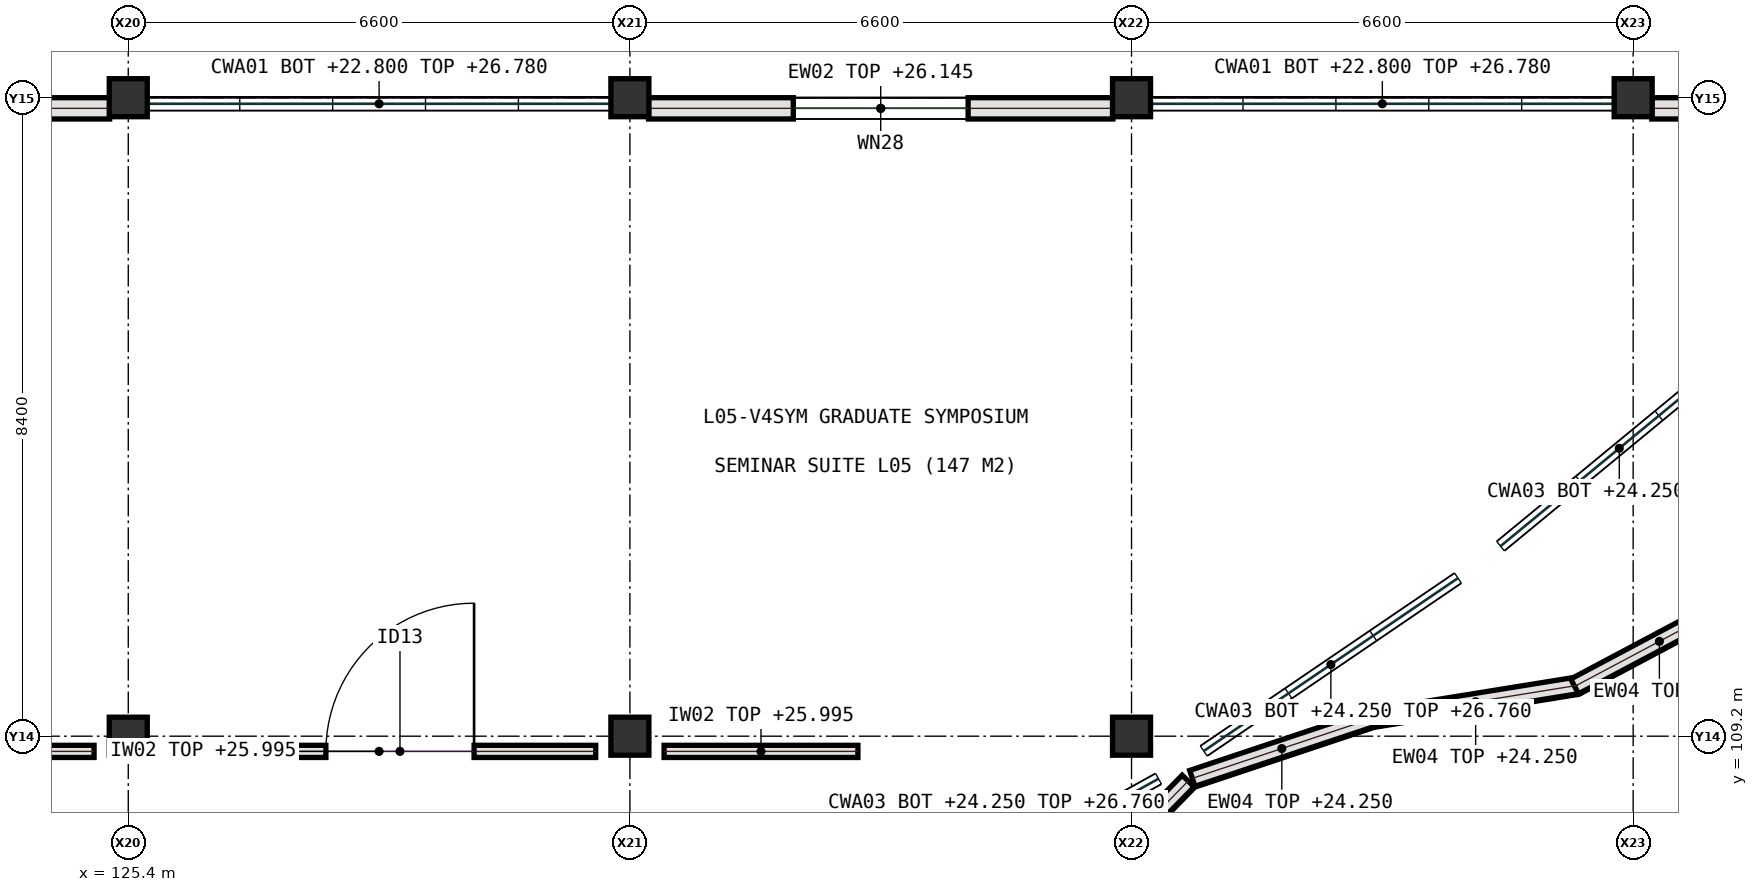
"""IFC4 building model, lengths in metres.
Left out: names, types, materials, properties, quantities, classifications, styles, units other than length and angle.
Written with IfcOpenShell. Run it as: python <this file> out.ifc"""

import sys

from ifc_helpers import new_model, si_unit, direction, frame, frame_2d, origin, origin_2d, place, context, subcontext, project, spatial, rectangle, extrude, element, fill, save


model = new_model("IFC4")
c1 = context("Model", 3, precision=1e-05, world=origin(), true_north=direction((0.0, 1.0)))
c2 = subcontext(c1, "Body", "Model", "MODEL_VIEW")
j1 = project(units=[si_unit("LENGTHUNIT", "METRE"), si_unit("PLANEANGLEUNIT", "RADIAN")], contexts=[c1])
p1 = place(None, origin())
s1 = spatial("IfcSite", under=j1, at=p1, CompositionType="ELEMENT")
p2 = place(p1, origin())
s2 = spatial("IfcBuilding", under=s1, at=p2, CompositionType="ELEMENT")
p3 = place(p2, frame((0.0, 0.0, 22.8)))
s3 = spatial("IfcBuildingStorey", under=s2, at=p3, CompositionType="ELEMENT", Elevation=22.8)
for number, where, z_axis, x_axis in (
    (1, (125.4, 109.2, 0.0), (0.0, 0.0, 1.0), (1.0, 0.0, 0.0)),
    (2, (125.4, 117.6, 0.0), (0.0, 0.0, 1.0), (1.0, 0.0, 0.0)),
    (3, (132.0, 109.2, 0.0), (0.0, 0.0, 1.0), (1.0, 0.0, 0.0)),
    (4, (132.0, 117.6, 0.0), (0.0, 0.0, 1.0), (1.0, 0.0, 0.0)),
    (5, (138.6, 109.2, 0.0), (0.0, 0.0, 1.0), (1.0, 0.0, 0.0)),
    (6, (138.6, 117.6, 0.0), (0.0, 0.0, 1.0), (1.0, 0.0, 0.0)),
    (7, (145.2, 117.6, 0.0), (0.0, 0.0, 1.0), (1.0, 0.0, 0.0)),
):
    element("IfcColumn", number, at=place(p3, frame(where, z_axis=z_axis, x_axis=x_axis)), inside=s3, PredefinedType="COLUMN", context=c2, shape_type="SweptSolid", body=[
        extrude(rectangle(XDim=0.5, YDim=0.5, at=origin_2d()), origin(), (0.0, 0.0, 1.0), 4.2),
    ])
p4 = place(p3, frame((119.25, 109.0, 0.0), z_axis=(0.0, 0.0, 1.0), x_axis=(1.0, 0.0, 0.0)))
e8 = element("IfcWall", 8, at=p4, inside=s3, PredefinedType="PARTITIONING", context=c2, shape_type="SweptSolid", body=[
    extrude(rectangle(XDim=5.7, YDim=0.16, at=frame_2d((2.85, 0.0))), origin(), (0.0, 0.0, 1.0), 3.195),
])
p5 = place(p3, frame((125.85, 109.0, 0.0), z_axis=(0.0, 0.0, 1.0), x_axis=(1.0, 0.0, 0.0)))
e9 = element("IfcWall", 9, at=p5, inside=s3, PredefinedType="PARTITIONING", context=c2, shape_type="SweptSolid", body=[
    extrude(rectangle(XDim=5.7, YDim=0.16, at=frame_2d((2.85, 0.0))), origin(), (0.0, 0.0, 1.0), 3.195),
])
p6 = place(p5, frame((2.15, 0.0, 0.0)))
e10 = element("IfcOpeningElement", 10, at=p6, cuts=e9, PredefinedType="OPENING", context=c2, shape_type="SweptSolid", body=[
    extrude(rectangle(XDim=1.95, YDim=2.35, at=frame_2d((0.975, 1.175))), frame((0.0, 0.09, 0.0), z_axis=(0.0, -1.0, 0.0), x_axis=(1.0, 0.0, 0.0)), (0.0, 0.0, 1.0), 0.18),
])
p7 = place(p3, frame((132.45, 109.0, 0.0), z_axis=(0.0, 0.0, 1.0), x_axis=(1.0, 0.0, 0.0)))
e11 = element("IfcWall", 11, at=p7, inside=s3, PredefinedType="PARTITIONING", context=c2, shape_type="SweptSolid", body=[
    extrude(rectangle(XDim=2.55, YDim=0.16, at=frame_2d((1.275, 0.0))), origin(), (0.0, 0.0, 1.0), 3.195),
])
p8 = place(p3, frame((125.155, 117.46, 0.0), z_axis=(0.0, 0.0, 1.0), x_axis=(-1.0, 0.0, 0.0)))
e12 = element("IfcWall", 12, at=p8, inside=s3, PredefinedType="SOLIDWALL", context=c2, shape_type="SweptSolid", body=[
    extrude(rectangle(XDim=6.11, YDim=0.28, at=frame_2d((3.055, 0.0))), origin(), (0.0, 0.0, 1.0), 3.345),
])
p9 = place(p8, frame((2.205, 0.0, 0.95)))
e13 = element("IfcOpeningElement", 13, at=p9, cuts=e12, PredefinedType="OPENING", context=c2, shape_type="SweptSolid", body=[
    extrude(rectangle(XDim=1.7, YDim=1.95, at=frame_2d((0.85, 0.975))), frame((0.0, 0.15, 0.0), z_axis=(0.0, -1.0, 0.0), x_axis=(1.0, 0.0, 0.0)), (0.0, 0.0, 1.0), 0.3),
])
p10 = place(p3, frame((138.355, 117.46, 0.0), z_axis=(0.0, 0.0, 1.0), x_axis=(-1.0, 0.0, 0.0)))
e14 = element("IfcWall", 14, at=p10, inside=s3, PredefinedType="SOLIDWALL", context=c2, shape_type="SweptSolid", body=[
    extrude(rectangle(XDim=6.11, YDim=0.28, at=frame_2d((3.055, 0.0))), origin(), (0.0, 0.0, 1.0), 3.345),
])
p11 = place(p10, frame((1.905, 0.0, 0.95)))
e15 = element("IfcOpeningElement", 15, at=p11, cuts=e14, PredefinedType="OPENING", context=c2, shape_type="SweptSolid", body=[
    extrude(rectangle(XDim=2.3, YDim=1.95, at=frame_2d((1.15, 0.975))), frame((0.0, 0.15, 0.0), z_axis=(0.0, -1.0, 0.0), x_axis=(1.0, 0.0, 0.0)), (0.0, 0.0, 1.0), 0.3),
])
p12 = place(p3, frame((137.6, 106.825, 0.0), z_axis=(0.0, 0.0, 1.0), x_axis=(0.698992065981, 0.715129423038, 0.0)))
e16 = element("IfcWall", 16, at=p12, inside=s3, PredefinedType="SOLIDWALL", context=c2, shape_type="SweptSolid", body=[
    extrude(rectangle(XDim=2.496, YDim=0.22, at=frame_2d((1.248, 0.0))), origin(), (0.0, 0.0, 1.0), 1.45),
])
p13 = place(p3, frame((139.4, 108.645, 0.0), z_axis=(0.0, 0.0, 1.0), x_axis=(0.948693132685, 0.316198260583, 0.0)))
e17 = element("IfcWall", 17, at=p13, inside=s3, PredefinedType="SOLIDWALL", context=c2, shape_type="SweptSolid", body=[
    extrude(rectangle(XDim=2.482, YDim=0.22, at=frame_2d((1.241, 0.0))), origin(), (0.0, 0.0, 1.0), 1.45),
])
p14 = place(p3, frame((141.78, 109.435, 0.0), z_axis=(0.0, 0.0, 1.0), x_axis=(0.987219797372, 0.159364587274, 0.0)))
e18 = element("IfcWall", 18, at=p14, inside=s3, PredefinedType="SOLIDWALL", context=c2, shape_type="SweptSolid", body=[
    extrude(rectangle(XDim=2.73, YDim=0.22, at=frame_2d((1.365, 0.0))), origin(), (0.0, 0.0, 1.0), 1.45),
])
p15 = place(p3, frame((144.43, 109.855, 0.0), z_axis=(0.0, 0.0, 1.0), x_axis=(0.883053125192, 0.469273031496, 0.0)))
e19 = element("IfcWall", 19, at=p15, inside=s3, PredefinedType="SOLIDWALL", context=c2, shape_type="SweptSolid", body=[
    extrude(rectangle(XDim=2.525, YDim=0.22, at=frame_2d((1.263, 0.0))), origin(), (0.0, 0.0, 1.0), 1.45),
])
p16 = place(p3, frame((149.93, 117.46, 0.0), z_axis=(0.0, 0.0, 1.0), x_axis=(-1.0, 0.0, 0.0)))
e20 = element("IfcWall", 20, at=p16, inside=s3, PredefinedType="SOLIDWALL", context=c2, shape_type="SweptSolid", body=[
    extrude(rectangle(XDim=4.485, YDim=0.28, at=frame_2d((2.242, 0.0))), origin(), (0.0, 0.0, 1.0), 3.345),
])
p17 = place(p16, frame((1.345, 0.0, 0.95)))
e21 = element("IfcOpeningElement", 21, at=p17, cuts=e20, PredefinedType="OPENING", context=c2, shape_type="SweptSolid", body=[
    extrude(rectangle(XDim=1.8, YDim=1.6, at=frame_2d((0.9, 0.8))), frame((0.0, 0.15, 0.0), z_axis=(0.0, -1.0, 0.0), x_axis=(1.0, 0.0, 0.0)), (0.0, 0.0, 1.0), 0.3),
])
p18 = place(p6, origin())
e22 = element("IfcDoor", 22, at=p18, inside=s3, OperationType="SINGLE_SWING_RIGHT", PredefinedType="DOOR", context=c2, shape_type="SweptSolid", body=[
    extrude(rectangle(XDim=1.95, YDim=2.35, at=frame_2d((0.975, 1.175))), frame((0.0, 0.025, 0.0), z_axis=(0.0, -1.0, 0.0), x_axis=(1.0, 0.0, 0.0)), (0.0, 0.0, 1.0), 0.05),
])
fill(e10, e22)
p19 = place(p11, origin())
e23 = element("IfcWindow", 23, at=p19, inside=s3, PartitioningType="SINGLE_PANEL", PredefinedType="WINDOW", context=c2, shape_type="SweptSolid", body=[
    extrude(rectangle(XDim=2.3, YDim=1.95, at=frame_2d((1.15, 0.975))), frame((0.0, 0.03, 0.0), z_axis=(0.0, -1.0, 0.0), x_axis=(1.0, 0.0, 0.0)), (0.0, 0.0, 1.0), 0.06),
])
fill(e15, e23)
save(model, sys.argv[1])
